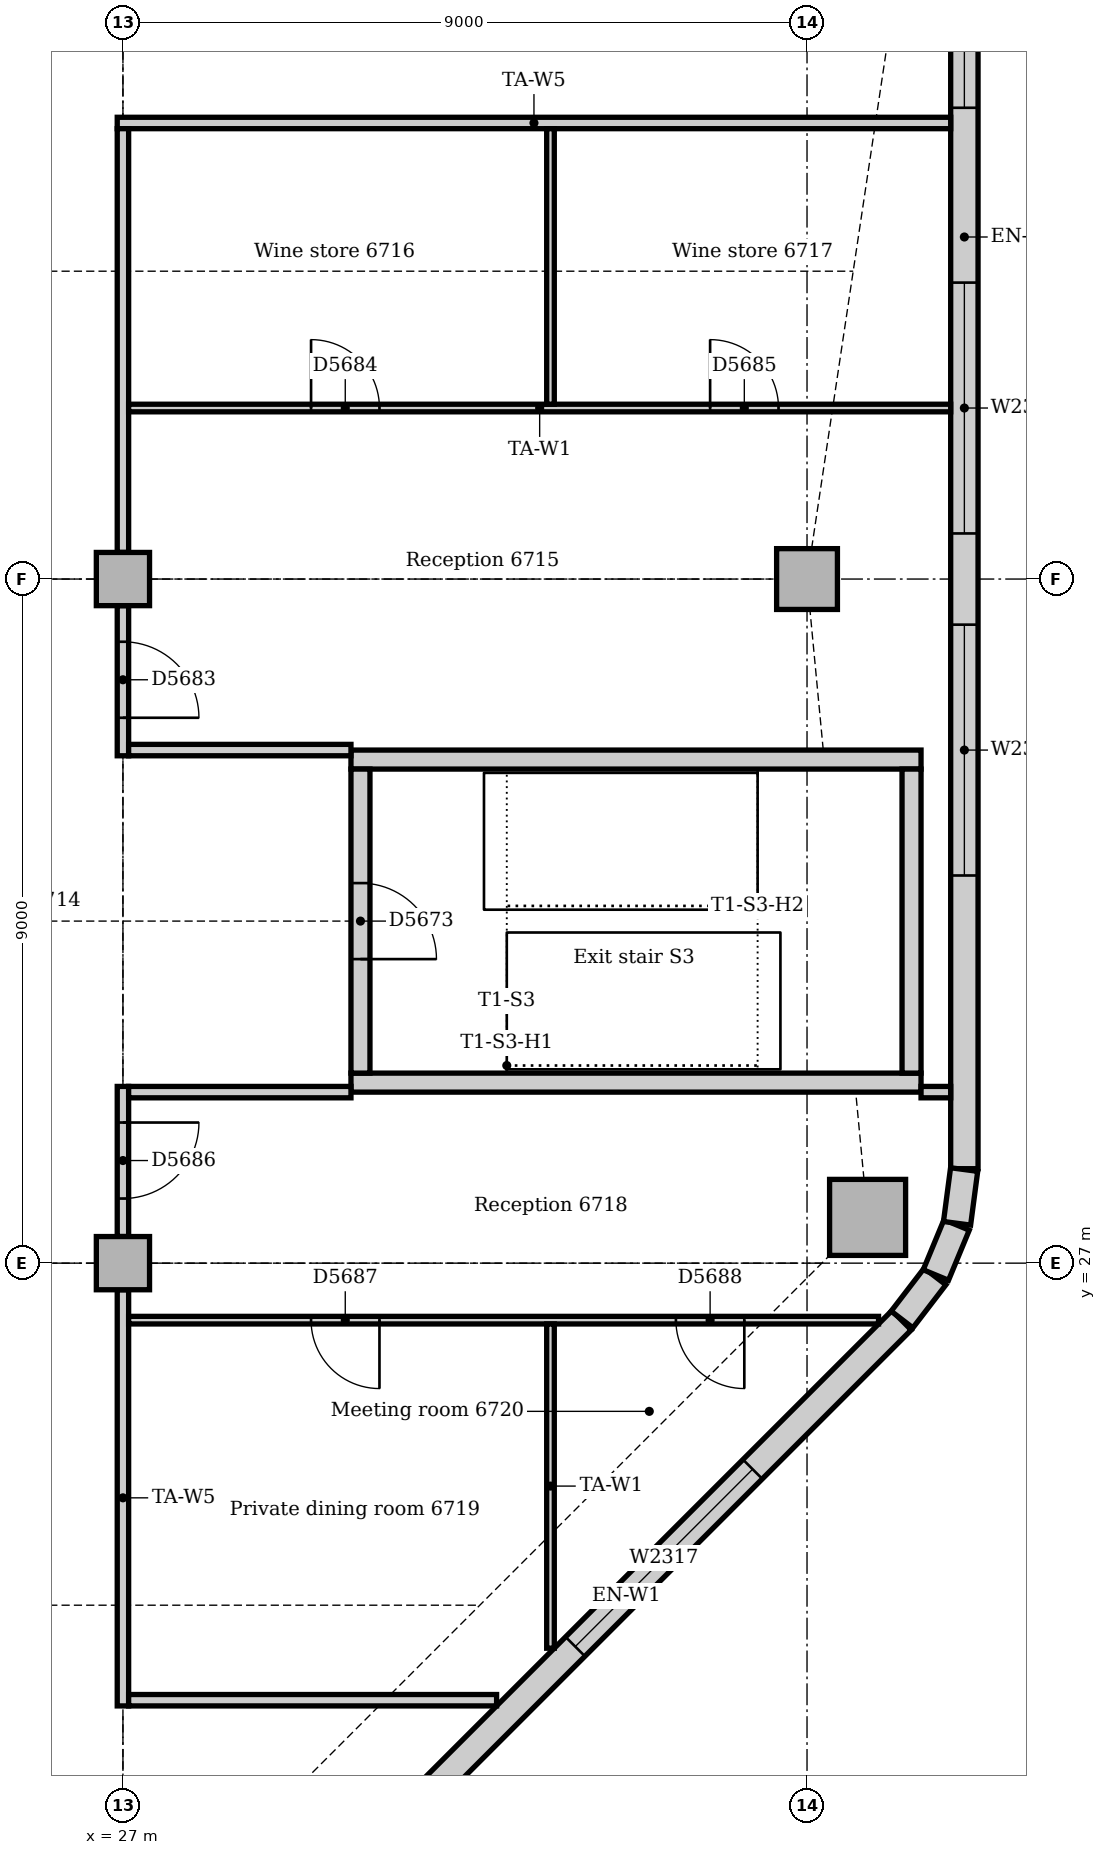
"""IFC4 building model, lengths in metres.
Left out: names, types, materials, properties, quantities, classifications, styles, units other than length and angle.
Written with IfcOpenShell. Run it as: python <this file> out.ifc"""

import sys

from ifc_helpers import new_model, si_unit, direction, frame, frame_2d, origin, origin_2d, place, context, subcontext, project, spatial, rectangle, extrude, element, fill, save


model = new_model("IFC4")
c1 = context("Model", 3, precision=1e-05, world=origin(), true_north=direction((0.0, 1.0)))
c2 = subcontext(c1, "Body", "Model", "MODEL_VIEW")
j1 = project(units=[si_unit("LENGTHUNIT", "METRE"), si_unit("PLANEANGLEUNIT", "RADIAN")], contexts=[c1])
p1 = place(None, origin())
s1 = spatial("IfcSite", under=j1, at=p1, CompositionType="ELEMENT")
p2 = place(p1, origin())
s2 = spatial("IfcBuilding", under=s1, at=p2, CompositionType="ELEMENT")
p3 = place(p2, frame((0.0, 0.0, 279.0)))
s3 = spatial("IfcBuildingStorey", under=s2, at=p3, CompositionType="ELEMENT", Elevation=279.0)
for number, where, z_axis, x_axis in (
    (1, (30.0, 29.375, 0.0), (0.0, 0.0, 1.0), (1.0, 0.0, 0.0)),
    (2, (37.5, 33.625, 0.0), (0.0, 0.0, 1.0), (-1.0, 0.0, 0.0)),
):
    element("IfcWall", number, at=place(p3, frame(where, z_axis=z_axis, x_axis=x_axis)), inside=s3, PredefinedType="SOLIDWALL", context=c2, shape_type="SweptSolid", body=[
        extrude(rectangle(XDim=7.5, YDim=0.25, at=frame_2d((3.75, 0.0))), origin(), (0.0, 0.0, 1.0), 4.0),
    ])
p4 = place(p3, frame((37.375, 29.5, 0.0), z_axis=(0.0, 0.0, 1.0), x_axis=(0.0, 1.0, 0.0)))
e3 = element("IfcWall", 3, at=p4, inside=s3, PredefinedType="SOLIDWALL", context=c2, shape_type="SweptSolid", body=[
    extrude(rectangle(XDim=4.0, YDim=0.25, at=frame_2d((2.0, 0.0))), origin(), (0.0, 0.0, 1.0), 4.0),
])
p5 = place(p3, frame((30.125, 33.5, 0.0), z_axis=(0.0, 0.0, 1.0), x_axis=(0.0, -1.0, 0.0)))
e4 = element("IfcWall", 4, at=p5, inside=s3, PredefinedType="SOLIDWALL", context=c2, shape_type="SweptSolid", body=[
    extrude(rectangle(XDim=4.0, YDim=0.25, at=frame_2d((2.0, 0.0))), origin(), (0.0, 0.0, 1.0), 4.0),
])
p6 = place(p5, frame((1.5, 0.0, 0.0)))
e5 = element("IfcOpeningElement", 5, at=p6, cuts=e4, PredefinedType="OPENING", context=c2, shape_type="SweptSolid", body=[
    extrude(rectangle(XDim=1.0, YDim=2.1, at=frame_2d((0.5, 1.05))), frame((0.0, 0.135, 0.0), z_axis=(0.0, -1.0, 0.0), x_axis=(1.0, 0.0, 0.0)), (0.0, 0.0, 1.0), 0.27),
])
p7 = place(p3, frame((36.797, 27.602, 0.0), z_axis=(0.0, 0.0, 1.0), x_axis=(1.0, 0.0, 0.0)))
e6 = element("IfcColumn", 6, at=p7, inside=s3, PredefinedType="COLUMN", context=c2, shape_type="SweptSolid", body=[
    extrude(rectangle(XDim=1.0, YDim=1.0, at=origin_2d()), origin(), (0.0, 0.0, 1.0), 3.8),
])
p8 = place(p3, frame((36.0, 36.0, 0.0), z_axis=(0.0, 0.0, 1.0), x_axis=(1.0, 0.0, 0.0)))
e7 = element("IfcColumn", 7, at=p8, inside=s3, PredefinedType="COLUMN", context=c2, shape_type="SweptSolid", body=[
    extrude(rectangle(XDim=0.8, YDim=0.8, at=origin_2d()), origin(), (0.0, 0.0, 1.0), 3.8),
])
for number, where, z_axis, x_axis in (
    (8, (27.0, 27.0, 0.0), (0.0, 0.0, 1.0), (1.0, 0.0, 0.0)),
    (9, (27.0, 36.0, 0.0), (0.0, 0.0, 1.0), (1.0, 0.0, 0.0)),
):
    element("IfcColumn", number, at=place(p3, frame(where, z_axis=z_axis, x_axis=x_axis)), inside=s3, PredefinedType="COLUMN", context=c2, shape_type="SweptSolid", body=[
        extrude(rectangle(XDim=0.7, YDim=0.7, at=origin_2d()), origin(), (0.0, 0.0, 1.0), 3.8),
    ])
p9 = place(p3, frame((30.001, 19.006, 0.0), z_axis=(0.0, 0.0, 1.0), x_axis=(0.707106781187, 0.707106781187, 0.0)))
e10 = element("IfcWall", 10, at=p9, inside=s3, PredefinedType="STANDARD", context=c2, shape_type="SweptSolid", body=[
    extrude(rectangle(XDim=10.243, YDim=0.36, at=frame_2d((5.121, 0.0))), origin(), (0.0, 0.0, 1.0), 3.8),
])
p10 = place(p9, frame((4.171, 0.0, 0.9)))
e11 = element("IfcOpeningElement", 11, at=p10, cuts=e10, PredefinedType="OPENING", context=c2, shape_type="SweptSolid", body=[
    extrude(rectangle(XDim=3.3, YDim=1.6, at=frame_2d((1.65, 0.8))), frame((0.0, 0.19, 0.0), z_axis=(0.0, -1.0, 0.0), x_axis=(1.0, 0.0, 0.0)), (0.0, 0.0, 1.0), 0.38),
])
p11 = place(p3, frame((38.07, 28.243, 0.0), z_axis=(0.0, 0.0, 1.0), x_axis=(0.0, 1.0, 0.0)))
e12 = element("IfcWall", 12, at=p11, inside=s3, PredefinedType="STANDARD", context=c2, shape_type="SweptSolid", body=[
    extrude(rectangle(XDim=24.515, YDim=0.36, at=frame_2d((12.257, 0.0))), origin(), (0.0, 0.0, 1.0), 3.8),
])
p12 = place(p11, frame((3.857, 0.0, 0.9)))
e13 = element("IfcOpeningElement", 13, at=p12, cuts=e12, PredefinedType="OPENING", context=c2, shape_type="SweptSolid", body=[
    extrude(rectangle(XDim=3.3, YDim=1.6, at=frame_2d((1.65, 0.8))), frame((0.0, 0.19, 0.0), z_axis=(0.0, -1.0, 0.0), x_axis=(1.0, 0.0, 0.0)), (0.0, 0.0, 1.0), 0.38),
])
p13 = place(p11, frame((8.357, 0.0, 0.9)))
e14 = element("IfcOpeningElement", 14, at=p13, cuts=e12, PredefinedType="OPENING", context=c2, shape_type="SweptSolid", body=[
    extrude(rectangle(XDim=3.3, YDim=1.6, at=frame_2d((1.65, 0.8))), frame((0.0, 0.19, 0.0), z_axis=(0.0, -1.0, 0.0), x_axis=(1.0, 0.0, 0.0)), (0.0, 0.0, 1.0), 0.38),
])
p14 = place(p11, frame((13.957, 0.0, 0.9)))
e15 = element("IfcOpeningElement", 15, at=p14, cuts=e12, PredefinedType="OPENING", context=c2, shape_type="SweptSolid", body=[
    extrude(rectangle(XDim=1.8, YDim=1.6, at=frame_2d((0.9, 0.8))), frame((0.0, 0.19, 0.0), z_axis=(0.0, -1.0, 0.0), x_axis=(1.0, 0.0, 0.0)), (0.0, 0.0, 1.0), 0.38),
])
p15 = place(p11, frame((17.757, 0.0, 0.9)))
e16 = element("IfcOpeningElement", 16, at=p15, cuts=e12, PredefinedType="OPENING", context=c2, shape_type="SweptSolid", body=[
    extrude(rectangle(XDim=1.8, YDim=1.6, at=frame_2d((0.9, 0.8))), frame((0.0, 0.19, 0.0), z_axis=(0.0, -1.0, 0.0), x_axis=(1.0, 0.0, 0.0)), (0.0, 0.0, 1.0), 0.38),
])
p16 = place(p3, frame((37.25, 26.259, 0.0), z_axis=(0.0, 0.0, 1.0), x_axis=(0.608802368033, 0.793321924995, 0.0)))
e17 = element("IfcWall", 17, at=p16, inside=s3, PredefinedType="STANDARD", context=c2, shape_type="SweptSolid", body=[
    extrude(rectangle(XDim=0.713, YDim=0.36, at=frame_2d((0.357, 0.0))), origin(), (0.0, 0.0, 1.0), 3.8),
])
for number, where, z_axis, x_axis in (
    (18, (37.695, 26.844, 0.0), (0.0, 0.0, 1.0), (0.383, 0.924, 0.0)),
    (19, (37.974, 27.524, 0.0), (0.0, 0.0, 1.0), (0.131, 0.991, 0.0)),
):
    element("IfcWall", number, at=place(p3, frame(where, z_axis=z_axis, x_axis=x_axis)), inside=s3, PredefinedType="STANDARD", context=c2, shape_type="SweptSolid", body=[
        extrude(rectangle(XDim=0.713, YDim=0.36, at=frame_2d((0.356, 0.0))), origin(), (0.0, 0.0, 1.0), 3.8),
    ])
p17 = place(p3, frame((26.925, 42.0, 0.0), z_axis=(0.0, 0.0, 1.0), x_axis=(1.0, 0.0, 0.0)))
e20 = element("IfcWall", 20, at=p17, inside=s3, PredefinedType="PARTITIONING", context=c2, shape_type="SweptSolid", body=[
    extrude(rectangle(XDim=10.965, YDim=0.15, at=frame_2d((5.482, 0.0))), origin(), (0.0, 0.0, 1.0), 3.8),
])
p18 = place(p3, frame((27.0, 33.675, 0.0), z_axis=(0.0, 0.0, 1.0), x_axis=(0.0, 1.0, 0.0)))
e21 = element("IfcWall", 21, at=p18, inside=s3, PredefinedType="PARTITIONING", context=c2, shape_type="SweptSolid", body=[
    extrude(rectangle(XDim=1.975, YDim=0.15, at=frame_2d((0.988, 0.0))), origin(), (0.0, 0.0, 1.0), 3.35),
])
p19 = place(p18, frame((0.5, 0.0, 0.0)))
e22 = element("IfcOpeningElement", 22, at=p19, cuts=e21, PredefinedType="OPENING", context=c2, shape_type="SweptSolid", body=[
    extrude(rectangle(XDim=1.0, YDim=2.1, at=frame_2d((0.5, 1.05))), frame((0.0, 0.085, 0.0), z_axis=(0.0, -1.0, 0.0), x_axis=(1.0, 0.0, 0.0)), (0.0, 0.0, 1.0), 0.17),
])
p20 = place(p3, frame((27.0, 36.35, 0.0), z_axis=(0.0, 0.0, 1.0), x_axis=(0.0, 1.0, 0.0)))
e23 = element("IfcWall", 23, at=p20, inside=s3, PredefinedType="PARTITIONING", context=c2, shape_type="SweptSolid", body=[
    extrude(rectangle(XDim=5.575, YDim=0.15, at=frame_2d((2.788, 0.0))), origin(), (0.0, 0.0, 1.0), 3.35),
])
p21 = place(p3, frame((27.0, 21.175, 0.0), z_axis=(0.0, 0.0, 1.0), x_axis=(0.0, 1.0, 0.0)))
e24 = element("IfcWall", 24, at=p21, inside=s3, PredefinedType="PARTITIONING", context=c2, shape_type="SweptSolid", body=[
    extrude(rectangle(XDim=5.475, YDim=0.15, at=frame_2d((2.737, 0.0))), origin(), (0.0, 0.0, 1.0), 3.35),
])
p22 = place(p3, frame((27.0, 27.35, 0.0), z_axis=(0.0, 0.0, 1.0), x_axis=(0.0, 1.0, 0.0)))
e25 = element("IfcWall", 25, at=p22, inside=s3, PredefinedType="PARTITIONING", context=c2, shape_type="SweptSolid", body=[
    extrude(rectangle(XDim=1.975, YDim=0.15, at=frame_2d((0.988, 0.0))), origin(), (0.0, 0.0, 1.0), 3.35),
])
p23 = place(p22, frame((0.5, 0.0, 0.0)))
e26 = element("IfcOpeningElement", 26, at=p23, cuts=e25, PredefinedType="OPENING", context=c2, shape_type="SweptSolid", body=[
    extrude(rectangle(XDim=1.0, YDim=2.1, at=frame_2d((0.5, 1.05))), frame((0.0, 0.085, 0.0), z_axis=(0.0, -1.0, 0.0), x_axis=(1.0, 0.0, 0.0)), (0.0, 0.0, 1.0), 0.17),
])
p24 = place(p3, frame((27.075, 21.25, 0.0), z_axis=(0.0, 0.0, 1.0), x_axis=(1.0, 0.0, 0.0)))
e27 = element("IfcWall", 27, at=p24, inside=s3, PredefinedType="PARTITIONING", context=c2, shape_type="SweptSolid", body=[
    extrude(rectangle(XDim=4.841, YDim=0.15, at=frame_2d((2.421, 0.0))), origin(), (0.0, 0.0, 1.0), 3.8),
])
for number, where, z_axis, x_axis in (
    (28, (27.075, 29.25, 0.0), (0.0, 0.0, 1.0), (1.0, 0.0, 0.0)),
    (29, (27.075, 33.75, 0.0), (0.0, 0.0, 1.0), (1.0, 0.0, 0.0)),
):
    element("IfcWall", number, at=place(p3, frame(where, z_axis=z_axis, x_axis=x_axis)), inside=s3, PredefinedType="PARTITIONING", context=c2, shape_type="SweptSolid", body=[
        extrude(rectangle(XDim=2.925, YDim=0.15, at=frame_2d((1.462, 0.0))), origin(), (0.0, 0.0, 1.0), 3.8),
    ])
p25 = place(p3, frame((37.5, 29.25, 0.0), z_axis=(0.0, 0.0, 1.0), x_axis=(1.0, 0.0, 0.0)))
e30 = element("IfcWall", 30, at=p25, inside=s3, PredefinedType="PARTITIONING", context=c2, shape_type="SweptSolid", body=[
    extrude(rectangle(XDim=0.39, YDim=0.15, at=frame_2d((0.195, 0.0))), origin(), (0.0, 0.0, 1.0), 3.8),
])
p26 = place(p3, frame((27.075, 38.25, 0.0), z_axis=(0.0, 0.0, 1.0), x_axis=(1.0, 0.0, 0.0)))
e31 = element("IfcWall", 31, at=p26, inside=s3, PredefinedType="PARTITIONING", context=c2, shape_type="SweptSolid", body=[
    extrude(rectangle(XDim=10.815, YDim=0.1, at=frame_2d((5.407, 0.0))), origin(), (0.0, 0.0, 1.0), 3.8),
])
p27 = place(p26, frame((2.4, 0.0, 0.0)))
e32 = element("IfcOpeningElement", 32, at=p27, cuts=e31, PredefinedType="OPENING", context=c2, shape_type="SweptSolid", body=[
    extrude(rectangle(XDim=0.9, YDim=2.1, at=frame_2d((0.45, 1.05))), frame((0.0, 0.06, 0.0), z_axis=(0.0, -1.0, 0.0), x_axis=(1.0, 0.0, 0.0)), (0.0, 0.0, 1.0), 0.12),
])
p28 = place(p26, frame((7.65, 0.0, 0.0)))
e33 = element("IfcOpeningElement", 33, at=p28, cuts=e31, PredefinedType="OPENING", context=c2, shape_type="SweptSolid", body=[
    extrude(rectangle(XDim=0.9, YDim=2.1, at=frame_2d((0.45, 1.05))), frame((0.0, 0.06, 0.0), z_axis=(0.0, -1.0, 0.0), x_axis=(1.0, 0.0, 0.0)), (0.0, 0.0, 1.0), 0.12),
])
p29 = place(p3, frame((27.075, 26.25, 0.0), z_axis=(0.0, 0.0, 1.0), x_axis=(1.0, 0.0, 0.0)))
e34 = element("IfcWall", 34, at=p29, inside=s3, PredefinedType="PARTITIONING", context=c2, shape_type="SweptSolid", body=[
    extrude(rectangle(XDim=9.866, YDim=0.1, at=frame_2d((4.933, 0.0))), origin(), (0.0, 0.0, 1.0), 3.8),
])
p30 = place(p29, frame((2.4, 0.0, 0.0)))
e35 = element("IfcOpeningElement", 35, at=p30, cuts=e34, PredefinedType="OPENING", context=c2, shape_type="SweptSolid", body=[
    extrude(rectangle(XDim=0.9, YDim=2.1, at=frame_2d((0.45, 1.05))), frame((0.0, 0.06, 0.0), z_axis=(0.0, -1.0, 0.0), x_axis=(1.0, 0.0, 0.0)), (0.0, 0.0, 1.0), 0.12),
])
p31 = place(p29, frame((7.2, 0.0, 0.0)))
e36 = element("IfcOpeningElement", 36, at=p31, cuts=e34, PredefinedType="OPENING", context=c2, shape_type="SweptSolid", body=[
    extrude(rectangle(XDim=0.9, YDim=2.1, at=frame_2d((0.45, 1.05))), frame((0.0, 0.06, 0.0), z_axis=(0.0, -1.0, 0.0), x_axis=(1.0, 0.0, 0.0)), (0.0, 0.0, 1.0), 0.12),
])
p32 = place(p3, frame((32.625, 21.934, 0.0), z_axis=(0.0, 0.0, 1.0), x_axis=(0.0, 1.0, 0.0)))
e37 = element("IfcWall", 37, at=p32, inside=s3, PredefinedType="PARTITIONING", context=c2, shape_type="SweptSolid", body=[
    extrude(rectangle(XDim=4.266, YDim=0.1, at=frame_2d((2.133, 0.0))), origin(), (0.0, 0.0, 1.0), 3.8),
])
p33 = place(p3, frame((32.625, 38.3, 0.0), z_axis=(0.0, 0.0, 1.0), x_axis=(0.0, 1.0, 0.0)))
e38 = element("IfcWall", 38, at=p33, inside=s3, PredefinedType="PARTITIONING", context=c2, shape_type="SweptSolid", body=[
    extrude(rectangle(XDim=3.625, YDim=0.1, at=frame_2d((1.812, 0.0))), origin(), (0.0, 0.0, 1.0), 3.8),
])
p34 = place(p10, origin())
e39 = element("IfcWindow", 39, at=p34, inside=s3, PartitioningType="SINGLE_PANEL", PredefinedType="WINDOW", context=c2, shape_type="SweptSolid", body=[
    extrude(rectangle(XDim=3.3, YDim=1.6, at=frame_2d((1.65, 0.8))), frame((0.0, 0.13, 0.0), z_axis=(0.0, -1.0, 0.0), x_axis=(1.0, 0.0, 0.0)), (0.0, 0.0, 1.0), 0.06),
])
fill(e11, e39)
p35 = place(p12, origin())
e40 = element("IfcWindow", 40, at=p35, inside=s3, PartitioningType="SINGLE_PANEL", PredefinedType="WINDOW", context=c2, shape_type="SweptSolid", body=[
    extrude(rectangle(XDim=3.3, YDim=1.6, at=frame_2d((1.65, 0.8))), frame((0.0, 0.13, 0.0), z_axis=(0.0, -1.0, 0.0), x_axis=(1.0, 0.0, 0.0)), (0.0, 0.0, 1.0), 0.06),
])
fill(e13, e40)
p36 = place(p13, origin())
e41 = element("IfcWindow", 41, at=p36, inside=s3, PartitioningType="SINGLE_PANEL", PredefinedType="WINDOW", context=c2, shape_type="SweptSolid", body=[
    extrude(rectangle(XDim=3.3, YDim=1.6, at=frame_2d((1.65, 0.8))), frame((0.0, 0.13, 0.0), z_axis=(0.0, -1.0, 0.0), x_axis=(1.0, 0.0, 0.0)), (0.0, 0.0, 1.0), 0.06),
])
fill(e14, e41)
p37 = place(p14, origin())
e42 = element("IfcWindow", 42, at=p37, inside=s3, PartitioningType="SINGLE_PANEL", PredefinedType="WINDOW", context=c2, shape_type="SweptSolid", body=[
    extrude(rectangle(XDim=1.8, YDim=1.6, at=frame_2d((0.9, 0.8))), frame((0.0, 0.13, 0.0), z_axis=(0.0, -1.0, 0.0), x_axis=(1.0, 0.0, 0.0)), (0.0, 0.0, 1.0), 0.06),
])
fill(e15, e42)
p38 = place(p6, origin())
e43 = element("IfcDoor", 43, at=p38, inside=s3, OperationType="SINGLE_SWING_RIGHT", PredefinedType="DOOR", context=c2, shape_type="SweptSolid", body=[
    extrude(rectangle(XDim=1.0, YDim=2.1, at=frame_2d((0.5, 1.05))), frame((0.0, 0.025, 0.0), z_axis=(0.0, -1.0, 0.0), x_axis=(1.0, 0.0, 0.0)), (0.0, 0.0, 1.0), 0.05),
])
fill(e5, e43)
p39 = place(p19, frame((1.0, 0.0, 0.0), z_axis=(0.0, 0.0, 1.0), x_axis=(-1.0, 0.0, 0.0)))
e44 = element("IfcDoor", 44, at=p39, inside=s3, OperationType="SINGLE_SWING_RIGHT", PredefinedType="DOOR", context=c2, shape_type="SweptSolid", body=[
    extrude(rectangle(XDim=1.0, YDim=2.1, at=frame_2d((0.5, 1.05))), frame((0.0, 0.025, 0.0), z_axis=(0.0, -1.0, 0.0), x_axis=(1.0, 0.0, 0.0)), (0.0, 0.0, 1.0), 0.05),
])
fill(e22, e44)
p40 = place(p27, origin())
e45 = element("IfcDoor", 45, at=p40, inside=s3, OperationType="SINGLE_SWING_LEFT", PredefinedType="DOOR", context=c2, shape_type="SweptSolid", body=[
    extrude(rectangle(XDim=0.9, YDim=2.1, at=frame_2d((0.45, 1.05))), frame((0.0, 0.025, 0.0), z_axis=(0.0, -1.0, 0.0), x_axis=(1.0, 0.0, 0.0)), (0.0, 0.0, 1.0), 0.05),
])
fill(e32, e45)
p41 = place(p28, origin())
e46 = element("IfcDoor", 46, at=p41, inside=s3, OperationType="SINGLE_SWING_LEFT", PredefinedType="DOOR", context=c2, shape_type="SweptSolid", body=[
    extrude(rectangle(XDim=0.9, YDim=2.1, at=frame_2d((0.45, 1.05))), frame((0.0, 0.025, 0.0), z_axis=(0.0, -1.0, 0.0), x_axis=(1.0, 0.0, 0.0)), (0.0, 0.0, 1.0), 0.05),
])
fill(e33, e46)
p42 = place(p23, frame((1.0, 0.0, 0.0), z_axis=(0.0, 0.0, 1.0), x_axis=(-1.0, 0.0, 0.0)))
e47 = element("IfcDoor", 47, at=p42, inside=s3, OperationType="SINGLE_SWING_LEFT", PredefinedType="DOOR", context=c2, shape_type="SweptSolid", body=[
    extrude(rectangle(XDim=1.0, YDim=2.1, at=frame_2d((0.5, 1.05))), frame((0.0, 0.025, 0.0), z_axis=(0.0, -1.0, 0.0), x_axis=(1.0, 0.0, 0.0)), (0.0, 0.0, 1.0), 0.05),
])
fill(e26, e47)
p43 = place(p30, frame((0.9, 0.0, 0.0), z_axis=(0.0, 0.0, 1.0), x_axis=(-1.0, 0.0, 0.0)))
e48 = element("IfcDoor", 48, at=p43, inside=s3, OperationType="SINGLE_SWING_LEFT", PredefinedType="DOOR", context=c2, shape_type="SweptSolid", body=[
    extrude(rectangle(XDim=0.9, YDim=2.1, at=frame_2d((0.45, 1.05))), frame((0.0, 0.025, 0.0), z_axis=(0.0, -1.0, 0.0), x_axis=(1.0, 0.0, 0.0)), (0.0, 0.0, 1.0), 0.05),
])
fill(e35, e48)
p44 = place(p31, frame((0.9, 0.0, 0.0), z_axis=(0.0, 0.0, 1.0), x_axis=(-1.0, 0.0, 0.0)))
e49 = element("IfcDoor", 49, at=p44, inside=s3, OperationType="SINGLE_SWING_LEFT", PredefinedType="DOOR", context=c2, shape_type="SweptSolid", body=[
    extrude(rectangle(XDim=0.9, YDim=2.1, at=frame_2d((0.45, 1.05))), frame((0.0, 0.025, 0.0), z_axis=(0.0, -1.0, 0.0), x_axis=(1.0, 0.0, 0.0)), (0.0, 0.0, 1.0), 0.05),
])
fill(e36, e49)
save(model, sys.argv[1])
